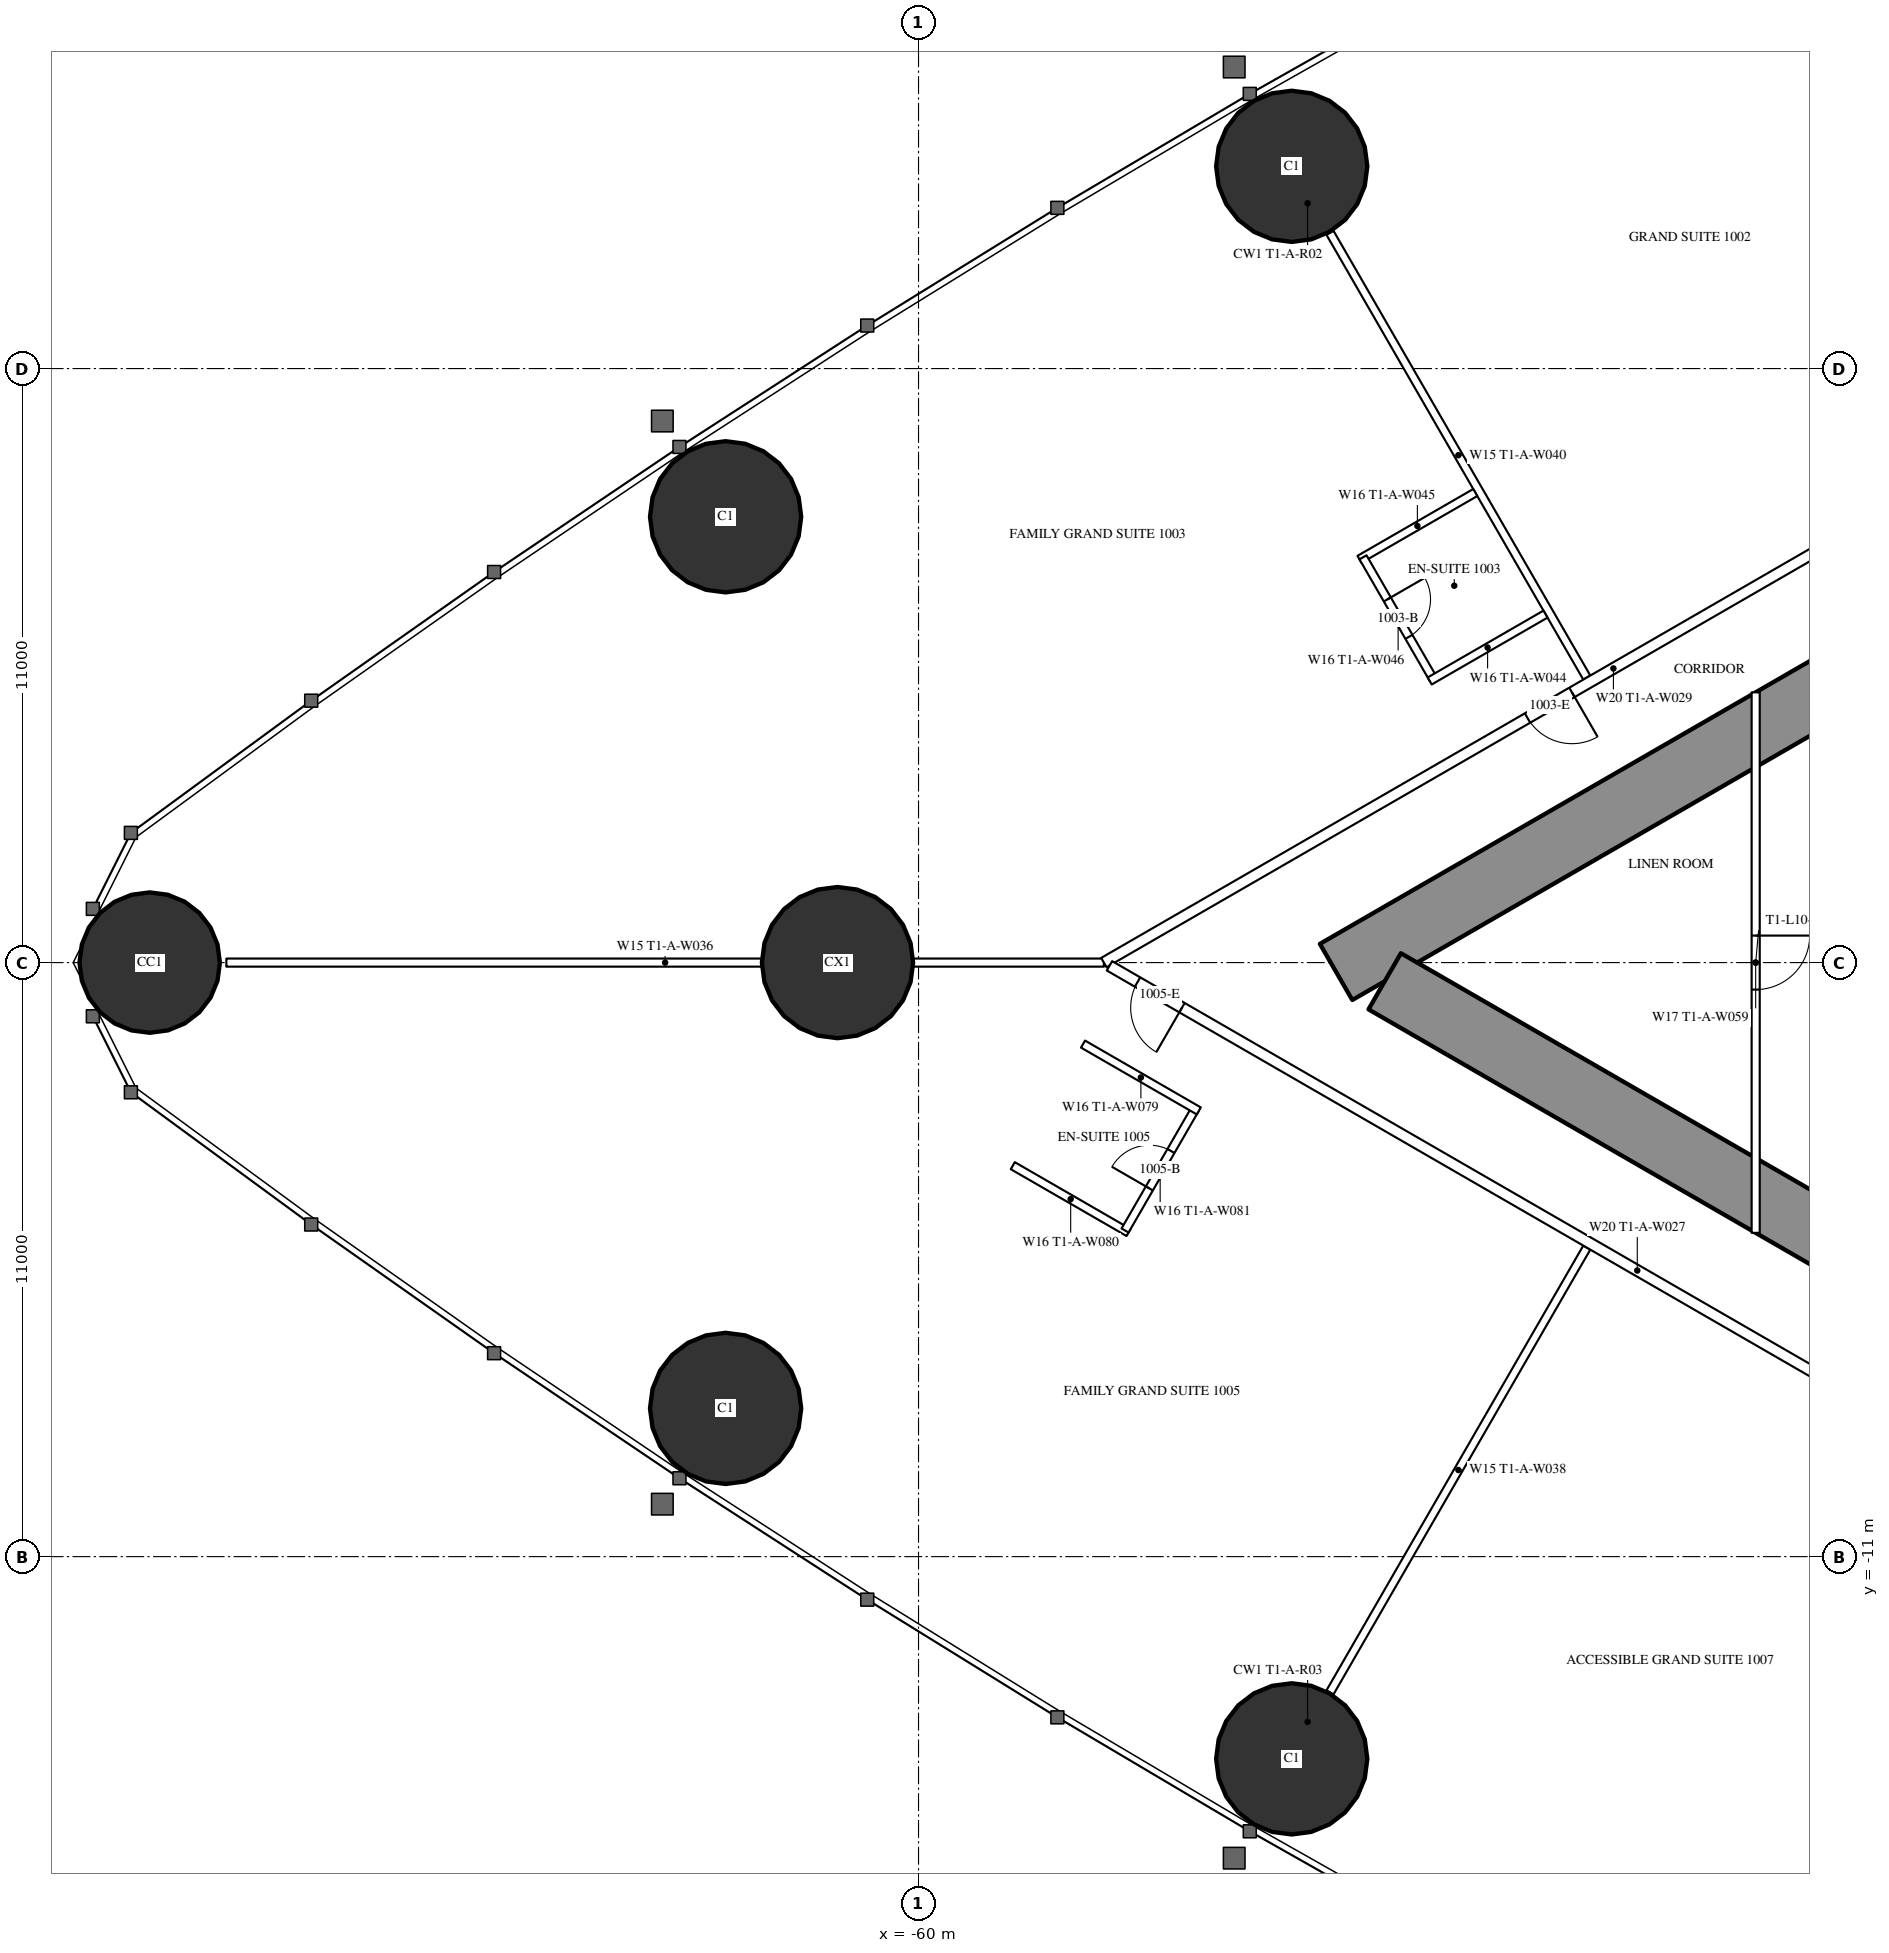
"""IFC4 building model, lengths in metres.
Left out: names, types, materials, properties, quantities, classifications, styles, units other than length and angle.
Written with IfcOpenShell. Run it as: python <this file> out.ifc"""

import sys

from ifc_helpers import new_model, si_unit, direction, frame, frame_2d, origin, origin_2d, place, context, subcontext, project, spatial, rectangle, hollow_circle, extrude, element, fill, save


model = new_model("IFC4")
c1 = context("Model", 3, precision=1e-05, world=origin(), true_north=direction((0.0, 1.0)))
c2 = subcontext(c1, "Body", "Model", "MODEL_VIEW")
j1 = project(units=[si_unit("LENGTHUNIT", "METRE"), si_unit("PLANEANGLEUNIT", "RADIAN")], contexts=[c1])
p1 = place(None, origin())
s1 = spatial("IfcSite", under=j1, at=p1, CompositionType="ELEMENT")
p2 = place(p1, origin())
s2 = spatial("IfcBuilding", under=s1, at=p2, CompositionType="ELEMENT")
p3 = place(p2, frame((0.0, 0.0, 42.5)))
s3 = spatial("IfcBuildingStorey", under=s2, at=p3, CompositionType="ELEMENT", Elevation=42.5)
p4 = place(p3, frame((-74.235, 0.0, 0.0), z_axis=(0.0, 0.0, 1.0), x_axis=(1.0, 0.0, 0.0)))
e1 = element("IfcColumn", 1, at=p4, inside=s3, PredefinedType="COLUMN", context=c2, shape_type="SweptSolid", body=[
    extrude(hollow_circle(Radius=1.3, WallThickness=0.1, at=origin_2d()), origin(), (0.0, 0.0, 1.0), 3.5),
])
for number, where, z_axis, x_axis in (
    (2, (-63.572, -8.255, 0.0), (0.0, 0.0, 1.0), (1.0, 0.0, 0.0)),
    (3, (-53.09, -14.745, 0.0), (0.0, 0.0, 1.0), (1.0, 0.0, 0.0)),
    (4, (-53.09, 14.745, 0.0), (0.0, 0.0, 1.0), (1.0, 0.0, 0.0)),
    (5, (-63.572, 8.255, 0.0), (0.0, 0.0, 1.0), (1.0, 0.0, 0.0)),
):
    element("IfcColumn", number, at=place(p3, frame(where, z_axis=z_axis, x_axis=x_axis)), inside=s3, PredefinedType="COLUMN", context=c2, shape_type="SweptSolid", body=[
        extrude(hollow_circle(Radius=1.4, WallThickness=0.12, at=origin_2d()), origin(), (0.0, 0.0, 1.0), 3.5),
    ])
p5 = place(p3, frame((-61.5, 0.0, 0.0), z_axis=(0.0, 0.0, 1.0), x_axis=(1.0, 0.0, 0.0)))
e6 = element("IfcColumn", 6, at=p5, inside=s3, PredefinedType="COLUMN", context=c2, shape_type="SweptSolid", body=[
    extrude(hollow_circle(Radius=1.4, WallThickness=0.1, at=origin_2d()), origin(), (0.0, 0.0, 1.0), 3.5),
])
p6 = place(p3, frame((-27.2, 14.3, 0.0), z_axis=(0.0, 0.0, 1.0), x_axis=(-0.866026593062, -0.499997940104, 0.0)))
e7 = element("IfcWall", 7, at=p6, inside=s3, PredefinedType="SHEAR", context=c2, shape_type="SweptSolid", body=[
    extrude(rectangle(XDim=28.946, YDim=1.2, at=frame_2d((14.473, 0.0))), origin(), (0.0, 0.0, 1.0), 3.5),
])
p7 = place(p6, frame((4.6, 0.0, 0.0)))
e8 = element("IfcOpeningElement", 8, at=p7, cuts=e7, PredefinedType="OPENING", context=c2, shape_type="SweptSolid", body=[
    extrude(rectangle(XDim=1.0, YDim=2.2, at=frame_2d((0.5, 1.1))), frame((0.0, 0.61, 0.0), z_axis=(0.0, -1.0, 0.0), x_axis=(1.0, 0.0, 0.0)), (0.0, 0.0, 1.0), 1.22),
])
p8 = place(p6, frame((13.395, 0.0, 0.0)))
e9 = element("IfcOpeningElement", 9, at=p8, cuts=e7, PredefinedType="OPENING", context=c2, shape_type="SweptSolid", body=[
    extrude(rectangle(XDim=1.8, YDim=2.2, at=frame_2d((0.9, 1.1))), frame((0.0, 0.61, 0.0), z_axis=(0.0, -1.0, 0.0), x_axis=(1.0, 0.0, 0.0)), (0.0, 0.0, 1.0), 1.22),
])
p9 = place(p3, frame((-27.2, -14.3, 0.0), z_axis=(0.0, 0.0, 1.0), x_axis=(-0.866024021859, 0.500002393557, 0.0)))
e10 = element("IfcWall", 10, at=p9, inside=s3, PredefinedType="SHEAR", context=c2, shape_type="SweptSolid", body=[
    extrude(rectangle(XDim=27.907, YDim=1.2, at=frame_2d((13.954, 0.0))), origin(), (0.0, 0.0, 1.0), 3.5),
])
p10 = place(p9, frame((4.6, 0.0, 0.0)))
e11 = element("IfcOpeningElement", 11, at=p10, cuts=e10, PredefinedType="OPENING", context=c2, shape_type="SweptSolid", body=[
    extrude(rectangle(XDim=1.0, YDim=2.2, at=frame_2d((0.5, 1.1))), frame((0.0, 0.61, 0.0), z_axis=(0.0, -1.0, 0.0), x_axis=(1.0, 0.0, 0.0)), (0.0, 0.0, 1.0), 1.22),
])
p11 = place(p9, frame((13.395, 0.0, 0.0)))
e12 = element("IfcOpeningElement", 12, at=p11, cuts=e10, PredefinedType="OPENING", context=c2, shape_type="SweptSolid", body=[
    extrude(rectangle(XDim=1.8, YDim=2.2, at=frame_2d((0.9, 1.1))), frame((0.0, 0.61, 0.0), z_axis=(0.0, -1.0, 0.0), x_axis=(1.0, 0.0, 0.0)), (0.0, 0.0, 1.0), 1.22),
])
for number, where, z_axis, x_axis in (
    (13, (-47.627, 5.278, 0.0), (0.0, 0.0, 1.0), (-0.5, 0.866, 0.0)),
    (14, (-47.627, -5.278, 0.0), (0.0, 0.0, 1.0), (-0.5, -0.866, 0.0)),
):
    element("IfcWall", number, at=place(p3, frame(where, z_axis=z_axis, x_axis=x_axis)), inside=s3, PredefinedType="PARTITIONING", context=c2, shape_type="SweptSolid", body=[
        extrude(rectangle(XDim=9.51, YDim=0.15, at=frame_2d((4.755, 0.0))), origin(), (0.0, 0.0, 1.0), 2.25),
    ])
p12 = place(p3, frame((-56.568, 0.0, 0.0), z_axis=(0.0, 0.0, 1.0), x_axis=(-1.0, 0.0, 0.0)))
e15 = element("IfcWall", 15, at=p12, inside=s3, PredefinedType="PARTITIONING", context=c2, shape_type="SweptSolid", body=[
    extrude(rectangle(XDim=16.247, YDim=0.15, at=frame_2d((8.124, 0.0))), origin(), (0.0, 0.0, 1.0), 2.25),
])
p13 = place(p3, frame((-37.7, 10.894, 0.0), z_axis=(0.0, 0.0, 1.0), x_axis=(-0.866027905338, -0.499995667157, 0.0)))
e16 = element("IfcWall", 16, at=p13, inside=s3, PredefinedType="PARTITIONING", context=c2, shape_type="SweptSolid", body=[
    extrude(rectangle(XDim=21.787, YDim=0.2, at=frame_2d((10.894, 0.0))), origin(), (0.0, 0.0, 1.0), 3.25),
])
p14 = place(p13, frame((11.78, 0.0, 0.0)))
e17 = element("IfcOpeningElement", 17, at=p14, cuts=e16, PredefinedType="OPENING", context=c2, shape_type="SweptSolid", body=[
    extrude(rectangle(XDim=0.95, YDim=2.2, at=frame_2d((0.475, 1.1))), frame((0.0, 0.11, 0.0), z_axis=(0.0, -1.0, 0.0), x_axis=(1.0, 0.0, 0.0)), (0.0, 0.0, 1.0), 0.22),
])
p15 = place(p13, frame((2.95, 0.0, 0.0)))
e18 = element("IfcOpeningElement", 18, at=p15, cuts=e16, PredefinedType="OPENING", context=c2, shape_type="SweptSolid", body=[
    extrude(rectangle(XDim=0.95, YDim=2.2, at=frame_2d((0.475, 1.1))), frame((0.0, 0.11, 0.0), z_axis=(0.0, -1.0, 0.0), x_axis=(1.0, 0.0, 0.0)), (0.0, 0.0, 1.0), 0.22),
])
p16 = place(p3, frame((-36.92, -11.344, 0.0), z_axis=(0.0, 0.0, 1.0), x_axis=(-0.866028313256, 0.499994960614, 0.0)))
e19 = element("IfcWall", 19, at=p16, inside=s3, PredefinedType="PARTITIONING", context=c2, shape_type="SweptSolid", body=[
    extrude(rectangle(XDim=22.568, YDim=0.2, at=frame_2d((11.284, 0.0))), origin(), (0.0, 0.0, 1.0), 3.25),
])
p17 = place(p16, frame((21.018, 0.0, 0.0)))
e20 = element("IfcOpeningElement", 20, at=p17, cuts=e19, PredefinedType="OPENING", context=c2, shape_type="SweptSolid", body=[
    extrude(rectangle(XDim=0.95, YDim=2.2, at=frame_2d((0.475, 1.1))), frame((0.0, 0.11, 0.0), z_axis=(0.0, -1.0, 0.0), x_axis=(1.0, 0.0, 0.0)), (0.0, 0.0, 1.0), 0.22),
])
p18 = place(p16, frame((3.35, 0.0, 0.0)))
e21 = element("IfcOpeningElement", 21, at=p18, cuts=e19, PredefinedType="OPENING", context=c2, shape_type="SweptSolid", body=[
    extrude(rectangle(XDim=1.0, YDim=2.2, at=frame_2d((0.5, 1.1))), frame((0.0, 0.11, 0.0), z_axis=(0.0, -1.0, 0.0), x_axis=(1.0, 0.0, 0.0)), (0.0, 0.0, 1.0), 0.22),
])
p19 = place(p3, frame((-49.692, 8.704, 0.0), z_axis=(0.0, 0.0, 1.0), x_axis=(-0.866073894602, -0.499916002032, 0.0)))
e22 = element("IfcWall", 22, at=p19, inside=s3, PredefinedType="PARTITIONING", context=c2, shape_type="SweptSolid", body=[
    extrude(rectangle(XDim=2.475, YDim=0.15, at=frame_2d((1.238, 0.0))), origin(), (0.0, 0.0, 1.0), 3.25),
])
p20 = place(p3, frame((-50.47, 5.253, 0.0), z_axis=(0.0, 0.0, 1.0), x_axis=(-0.500006934395, 0.866021400173, 0.0)))
e23 = element("IfcWall", 23, at=p20, inside=s3, PredefinedType="PARTITIONING", context=c2, shape_type="SweptSolid", body=[
    extrude(rectangle(XDim=2.6, YDim=0.15, at=frame_2d((1.3, 0.0))), origin(), (0.0, 0.0, 1.0), 3.25),
])
p21 = place(p20, frame((0.9, 0.0, 0.0)))
e24 = element("IfcOpeningElement", 24, at=p21, cuts=e23, PredefinedType="OPENING", context=c2, shape_type="SweptSolid", body=[
    extrude(rectangle(XDim=0.8, YDim=2.2, at=frame_2d((0.4, 1.1))), frame((0.0, 0.085, 0.0), z_axis=(0.0, -1.0, 0.0), x_axis=(1.0, 0.0, 0.0)), (0.0, 0.0, 1.0), 0.17),
])
p22 = place(p3, frame((-48.392, 6.453, 0.0), z_axis=(0.0, 0.0, 1.0), x_axis=(-0.86604923931, -0.499958713387, 0.0)))
e25 = element("IfcWall", 25, at=p22, inside=s3, PredefinedType="PARTITIONING", context=c2, shape_type="SweptSolid", body=[
    extrude(rectangle(XDim=2.475, YDim=0.15, at=frame_2d((1.237, 0.0))), origin(), (0.0, 0.0, 1.0), 3.25),
])
p23 = place(p3, frame((-56.111, -4.998, 0.0), z_axis=(0.0, 0.0, 1.0), x_axis=(-0.866031185235, 0.4999899861, 0.0)))
e26 = element("IfcWall", 26, at=p23, inside=s3, PredefinedType="PARTITIONING", context=c2, shape_type="SweptSolid", body=[
    extrude(rectangle(XDim=2.475, YDim=0.15, at=frame_2d((1.238, 0.0))), origin(), (0.0, 0.0, 1.0), 3.25),
])
p24 = place(p3, frame((-54.876, -2.709, 0.0), z_axis=(0.0, 0.0, 1.0), x_axis=(-0.500006934395, -0.866021400173, 0.0)))
e27 = element("IfcWall", 27, at=p24, inside=s3, PredefinedType="PARTITIONING", context=c2, shape_type="SweptSolid", body=[
    extrude(rectangle(XDim=2.6, YDim=0.15, at=frame_2d((1.3, 0.0))), origin(), (0.0, 0.0, 1.0), 3.25),
])
p25 = place(p24, frame((0.9, 0.0, 0.0)))
e28 = element("IfcOpeningElement", 28, at=p25, cuts=e27, PredefinedType="OPENING", context=c2, shape_type="SweptSolid", body=[
    extrude(rectangle(XDim=0.8, YDim=2.2, at=frame_2d((0.4, 1.1))), frame((0.0, 0.085, 0.0), z_axis=(0.0, -1.0, 0.0), x_axis=(1.0, 0.0, 0.0)), (0.0, 0.0, 1.0), 0.17),
])
p26 = place(p3, frame((-54.811, -2.747, 0.0), z_axis=(0.0, 0.0, 1.0), x_axis=(-0.866031185235, 0.4999899861, 0.0)))
e29 = element("IfcWall", 29, at=p26, inside=s3, PredefinedType="PARTITIONING", context=c2, shape_type="SweptSolid", body=[
    extrude(rectangle(XDim=2.475, YDim=0.15, at=frame_2d((1.238, 0.0))), origin(), (0.0, 0.0, 1.0), 3.25),
])
p27 = place(p3, frame((-44.5, 5.005, 0.0), z_axis=(0.0, 0.0, 1.0), x_axis=(0.0, -1.0, 0.0)))
e30 = element("IfcWall", 30, at=p27, inside=s3, PredefinedType="PARTITIONING", context=c2, shape_type="SweptSolid", body=[
    extrude(rectangle(XDim=10.009, YDim=0.15, at=frame_2d((5.005, 0.0))), origin(), (0.0, 0.0, 1.0), 2.45),
])
p28 = place(p27, frame((4.505, 0.0, 0.0)))
e31 = element("IfcOpeningElement", 31, at=p28, cuts=e30, PredefinedType="OPENING", context=c2, shape_type="SweptSolid", body=[
    extrude(rectangle(XDim=1.0, YDim=2.2, at=frame_2d((0.5, 1.1))), frame((0.0, 0.085, 0.0), z_axis=(0.0, -1.0, 0.0), x_axis=(1.0, 0.0, 0.0)), (0.0, 0.0, 1.0), 0.17),
])
p29 = place(p21, origin())
e32 = element("IfcDoor", 32, at=p29, inside=s3, OperationType="SINGLE_SWING_RIGHT", PredefinedType="DOOR", context=c2, shape_type="SweptSolid", body=[
    extrude(rectangle(XDim=0.8, YDim=2.2, at=frame_2d((0.4, 1.1))), frame((0.0, 0.025, 0.0), z_axis=(0.0, -1.0, 0.0), x_axis=(1.0, 0.0, 0.0)), (0.0, 0.0, 1.0), 0.05),
])
fill(e24, e32)
p30 = place(p14, origin())
e33 = element("IfcDoor", 33, at=p30, inside=s3, OperationType="SINGLE_SWING_LEFT", PredefinedType="DOOR", context=c2, shape_type="SweptSolid", body=[
    extrude(rectangle(XDim=0.95, YDim=2.2, at=frame_2d((0.475, 1.1))), frame((0.0, 0.025, 0.0), z_axis=(0.0, -1.0, 0.0), x_axis=(1.0, 0.0, 0.0)), (0.0, 0.0, 1.0), 0.05),
])
fill(e17, e33)
p31 = place(p25, origin())
e34 = element("IfcDoor", 34, at=p31, inside=s3, OperationType="SINGLE_SWING_RIGHT", PredefinedType="DOOR", context=c2, shape_type="SweptSolid", body=[
    extrude(rectangle(XDim=0.8, YDim=2.2, at=frame_2d((0.4, 1.1))), frame((0.0, 0.025, 0.0), z_axis=(0.0, -1.0, 0.0), x_axis=(1.0, 0.0, 0.0)), (0.0, 0.0, 1.0), 0.05),
])
fill(e28, e34)
p32 = place(p17, origin())
e35 = element("IfcDoor", 35, at=p32, inside=s3, OperationType="SINGLE_SWING_LEFT", PredefinedType="DOOR", context=c2, shape_type="SweptSolid", body=[
    extrude(rectangle(XDim=0.95, YDim=2.2, at=frame_2d((0.475, 1.1))), frame((0.0, 0.025, 0.0), z_axis=(0.0, -1.0, 0.0), x_axis=(1.0, 0.0, 0.0)), (0.0, 0.0, 1.0), 0.05),
])
fill(e20, e35)
p33 = place(p28, origin())
e36 = element("IfcDoor", 36, at=p33, inside=s3, OperationType="SINGLE_SWING_LEFT", PredefinedType="DOOR", context=c2, shape_type="SweptSolid", body=[
    extrude(rectangle(XDim=1.0, YDim=2.2, at=frame_2d((0.5, 1.1))), frame((0.0, 0.025, 0.0), z_axis=(0.0, -1.0, 0.0), x_axis=(1.0, 0.0, 0.0)), (0.0, 0.0, 1.0), 0.05),
])
fill(e31, e36)
save(model, sys.argv[1])
